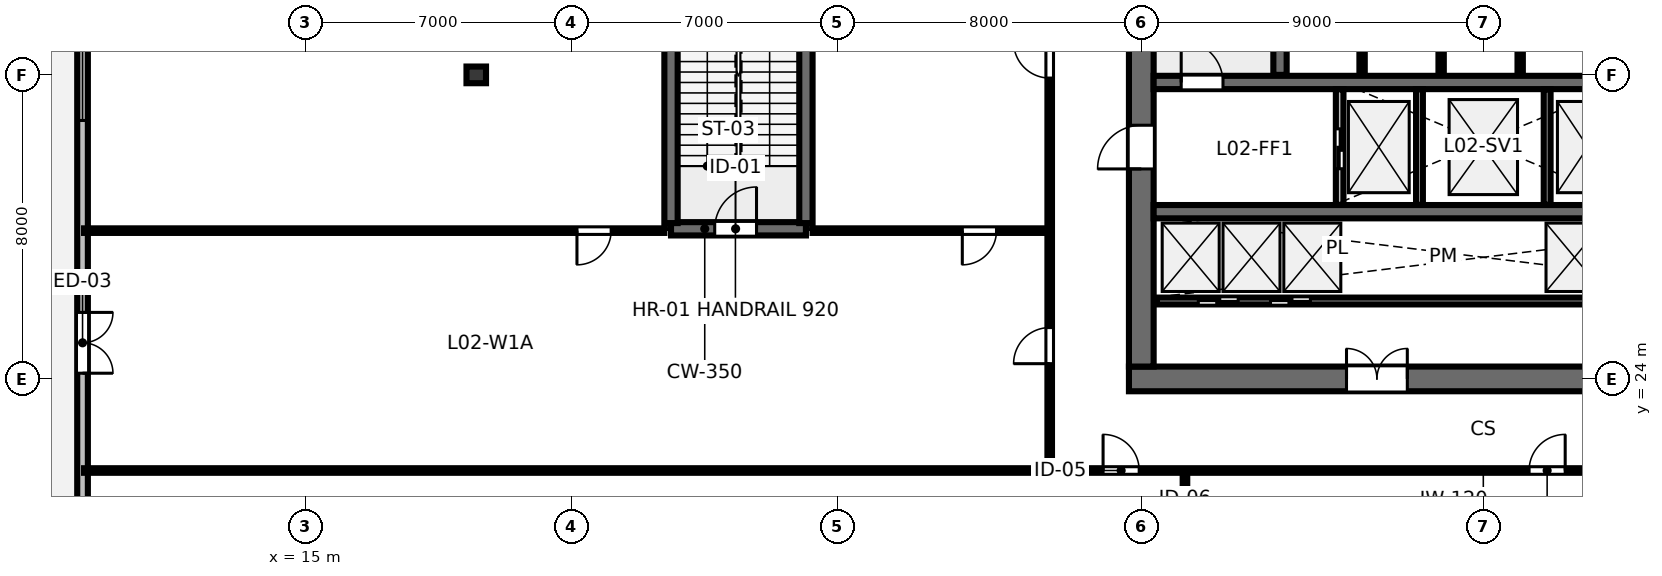
"""IFC4 building model, lengths in metres.
Left out: names, types, materials, properties, quantities, classifications, styles, units other than length and angle.
Written with IfcOpenShell. Run it as: python <this file> out.ifc"""

import sys

from ifc_helpers import new_model, si_unit, direction, frame, frame_2d, origin, origin_2d, place, context, subcontext, project, spatial, rectangle, i_section, extrude, element, fill, save


model = new_model("IFC4")
c1 = context("Model", 3, precision=1e-05, world=origin(), true_north=direction((0.0, 1.0)))
c2 = subcontext(c1, "Body", "Model", "MODEL_VIEW")
j1 = project(units=[si_unit("LENGTHUNIT", "METRE"), si_unit("PLANEANGLEUNIT", "RADIAN")], contexts=[c1])
p1 = place(None, origin())
s1 = spatial("IfcSite", under=j1, at=p1, CompositionType="ELEMENT")
p2 = place(p1, origin())
s2 = spatial("IfcBuilding", under=s1, at=p2, CompositionType="ELEMENT")
p3 = place(p2, frame((0.0, 0.0, 9.5)))
s3 = spatial("IfcBuildingStorey", under=s2, at=p3, CompositionType="ELEMENT", Elevation=9.5)
p4 = place(p3, frame((36.675, 24.0, 0.0), z_axis=(0.0, 0.0, 1.0), x_axis=(1.0, 0.0, 0.0)))
e1 = element("IfcWall", 1, at=p4, inside=s3, PredefinedType="SHEAR", context=c2, shape_type="SweptSolid", body=[
    extrude(rectangle(XDim=18.65, YDim=0.65, at=frame_2d((9.325, 0.0))), origin(), (0.0, 0.0, 1.0), 4.22),
])
p5 = place(p4, frame((5.725, 0.0, 0.0)))
e2 = element("IfcOpeningElement", 2, at=p5, cuts=e1, PredefinedType="OPENING", context=c2, shape_type="SweptSolid", body=[
    extrude(rectangle(XDim=1.6, YDim=2.15, at=frame_2d((0.8, 1.075))), frame((0.0, 0.335, 0.0), z_axis=(0.0, -1.0, 0.0), x_axis=(1.0, 0.0, 0.0)), (0.0, 0.0, 1.0), 0.67),
])
p6 = place(p4, frame((12.125, 0.0, 0.0)))
e3 = element("IfcOpeningElement", 3, at=p6, cuts=e1, PredefinedType="OPENING", context=c2, shape_type="SweptSolid", body=[
    extrude(rectangle(XDim=1.6, YDim=2.15, at=frame_2d((0.8, 1.075))), frame((0.0, 0.335, 0.0), z_axis=(0.0, -1.0, 0.0), x_axis=(1.0, 0.0, 0.0)), (0.0, 0.0, 1.0), 0.67),
])
p7 = place(p3, frame((37.0, 24.325, 0.0), z_axis=(0.0, 0.0, 1.0), x_axis=(0.0, 1.0, 0.0)))
e4 = element("IfcWall", 4, at=p7, inside=s3, PredefinedType="SHEAR", context=c2, shape_type="SweptSolid", body=[
    extrude(rectangle(XDim=15.35, YDim=0.65, at=frame_2d((7.675, 0.0))), origin(), (0.0, 0.0, 1.0), 4.22),
])
p8 = place(p7, frame((5.2, 0.0, 0.0)))
e5 = element("IfcOpeningElement", 5, at=p8, cuts=e4, PredefinedType="OPENING", context=c2, shape_type="SweptSolid", body=[
    extrude(rectangle(XDim=1.15, YDim=2.15, at=frame_2d((0.575, 1.075))), frame((0.0, 0.335, 0.0), z_axis=(0.0, -1.0, 0.0), x_axis=(1.0, 0.0, 0.0)), (0.0, 0.0, 1.0), 0.67),
])
p9 = place(p3, frame((37.325, 31.8, 0.0), z_axis=(0.0, 0.0, 1.0), x_axis=(1.0, 0.0, 0.0)))
e6 = element("IfcWall", 6, at=p9, inside=s3, PredefinedType="SHEAR", context=c2, shape_type="SweptSolid", body=[
    extrude(rectangle(XDim=17.35, YDim=0.35, at=frame_2d((8.675, 0.0))), origin(), (0.0, 0.0, 1.0), 4.22),
])
p10 = place(p9, frame((0.725, 0.0, 0.0)))
e7 = element("IfcOpeningElement", 7, at=p10, cuts=e6, PredefinedType="OPENING", context=c2, shape_type="SweptSolid", body=[
    extrude(rectangle(XDim=1.1, YDim=2.15, at=frame_2d((0.55, 1.075))), frame((0.0, 0.185, 0.0), z_axis=(0.0, -1.0, 0.0), x_axis=(1.0, 0.0, 0.0)), (0.0, 0.0, 1.0), 0.37),
])
p11 = place(p9, frame((14.625, 0.0, 0.0)))
e8 = element("IfcOpeningElement", 8, at=p11, cuts=e6, PredefinedType="OPENING", context=c2, shape_type="SweptSolid", body=[
    extrude(rectangle(XDim=1.1, YDim=2.15, at=frame_2d((0.55, 1.075))), frame((0.0, 0.185, 0.0), z_axis=(0.0, -1.0, 0.0), x_axis=(1.0, 0.0, 0.0)), (0.0, 0.0, 1.0), 0.37),
])
p12 = place(p3, frame((37.325, 28.4, 0.0), z_axis=(0.0, 0.0, 1.0), x_axis=(1.0, 0.0, 0.0)))
e9 = element("IfcWall", 9, at=p12, inside=s3, PredefinedType="SHEAR", context=c2, shape_type="SweptSolid", body=[
    extrude(rectangle(XDim=17.35, YDim=0.35, at=frame_2d((8.675, 0.0))), origin(), (0.0, 0.0, 1.0), 4.22),
])
p13 = place(p3, frame((19.5, 32.0, 0.0), z_axis=(0.0, 0.0, 1.0), x_axis=(0.0, 1.0, 0.0)))
e10 = element("IfcColumn", 10, at=p13, inside=s3, PredefinedType="COLUMN", context=c2, shape_type="SweptSolid", body=[
    extrude(i_section(OverallWidth=0.439, OverallDepth=0.514, WebThickness=0.06, FlangeThickness=0.097, FilletRadius=0.025, at=origin_2d()), origin(), (0.0, 0.0, 1.0), 4.208),
])
p14 = place(p3, frame((9.14, 53.24, 0.0), z_axis=(0.0, 0.0, 1.0), x_axis=(0.0, -1.0, 0.0)))
e11 = element("IfcWall", 11, at=p14, inside=s3, PredefinedType="STANDARD", context=c2, shape_type="SweptSolid", body=[
    extrude(rectangle(XDim=42.48, YDim=0.28, at=frame_2d((21.24, 0.0))), origin(), (0.0, 0.0, 1.0), 4.21),
])
p15 = place(p14, frame((27.49, 0.0, 0.0)))
e12 = element("IfcOpeningElement", 12, at=p15, cuts=e11, PredefinedType="OPENING", context=c2, shape_type="SweptSolid", body=[
    extrude(rectangle(XDim=1.6, YDim=2.15, at=frame_2d((0.8, 1.075))), frame((0.0, 0.15, 0.0), z_axis=(0.0, -1.0, 0.0), x_axis=(1.0, 0.0, 0.0)), (0.0, 0.0, 1.0), 0.3),
])
p16 = place(p14, frame((1.731, 0.0, 0.85)))
e13 = element("IfcOpeningElement", 13, at=p16, cuts=e11, PredefinedType="OPENING", context=c2, shape_type="SweptSolid", body=[
    extrude(rectangle(XDim=2.4, YDim=2.4, at=frame_2d((1.2, 1.2))), frame((0.0, 0.15, 0.0), z_axis=(0.0, -1.0, 0.0), x_axis=(1.0, 0.0, 0.0)), (0.0, 0.0, 1.0), 0.3),
])
p17 = place(p14, frame((5.393, 0.0, 0.85)))
e14 = element("IfcOpeningElement", 14, at=p17, cuts=e11, PredefinedType="OPENING", context=c2, shape_type="SweptSolid", body=[
    extrude(rectangle(XDim=2.4, YDim=2.4, at=frame_2d((1.2, 1.2))), frame((0.0, 0.15, 0.0), z_axis=(0.0, -1.0, 0.0), x_axis=(1.0, 0.0, 0.0)), (0.0, 0.0, 1.0), 0.3),
])
p18 = place(p14, frame((12.716, 0.0, 0.85)))
e15 = element("IfcOpeningElement", 15, at=p18, cuts=e11, PredefinedType="OPENING", context=c2, shape_type="SweptSolid", body=[
    extrude(rectangle(XDim=2.4, YDim=2.4, at=frame_2d((1.2, 1.2))), frame((0.0, 0.15, 0.0), z_axis=(0.0, -1.0, 0.0), x_axis=(1.0, 0.0, 0.0)), (0.0, 0.0, 1.0), 0.3),
])
p19 = place(p14, frame((20.04, 0.0, 0.85)))
e16 = element("IfcOpeningElement", 16, at=p19, cuts=e11, PredefinedType="OPENING", context=c2, shape_type="SweptSolid", body=[
    extrude(rectangle(XDim=2.4, YDim=2.4, at=frame_2d((1.2, 1.2))), frame((0.0, 0.15, 0.0), z_axis=(0.0, -1.0, 0.0), x_axis=(1.0, 0.0, 0.0)), (0.0, 0.0, 1.0), 0.3),
])
p20 = place(p14, frame((34.687, 0.0, 0.85)))
e17 = element("IfcOpeningElement", 17, at=p20, cuts=e11, PredefinedType="OPENING", context=c2, shape_type="SweptSolid", body=[
    extrude(rectangle(XDim=2.4, YDim=2.4, at=frame_2d((1.2, 1.2))), frame((0.0, 0.15, 0.0), z_axis=(0.0, -1.0, 0.0), x_axis=(1.0, 0.0, 0.0)), (0.0, 0.0, 1.0), 0.3),
])
p21 = place(p14, frame((38.349, 0.0, 0.85)))
e18 = element("IfcOpeningElement", 18, at=p21, cuts=e11, PredefinedType="OPENING", context=c2, shape_type="SweptSolid", body=[
    extrude(rectangle(XDim=2.4, YDim=2.4, at=frame_2d((1.2, 1.2))), frame((0.0, 0.15, 0.0), z_axis=(0.0, -1.0, 0.0), x_axis=(1.0, 0.0, 0.0)), (0.0, 0.0, 1.0), 0.3),
])
p22 = place(p3, frame((40.65, 32.0, 0.0), z_axis=(0.0, 0.0, 1.0), x_axis=(0.0, 1.0, 0.0)))
e19 = element("IfcWall", 19, at=p22, inside=s3, PredefinedType="SHEAR", context=c2, shape_type="SweptSolid", body=[
    extrude(rectangle(XDim=7.7, YDim=0.35, at=frame_2d((3.85, 0.0))), origin(), (0.0, 0.0, 1.0), 4.5),
])
for number, where, z_axis, x_axis in (
    (20, (42.81, 32.05, 0.0), (0.0, 0.0, 1.0), (0.0, 1.0, 0.0)),
    (21, (44.89, 32.05, 0.0), (0.0, 0.0, 1.0), (0.0, 1.0, 0.0)),
    (22, (46.97, 32.05, 0.0), (0.0, 0.0, 1.0), (0.0, 1.0, 0.0)),
):
    element("IfcWall", number, at=place(p3, frame(where, z_axis=z_axis, x_axis=x_axis)), inside=s3, PredefinedType="PARTITIONING", context=c2, shape_type="SweptSolid", body=[
        extrude(rectangle(XDim=5.5, YDim=0.14, at=frame_2d((2.75, 0.0))), origin(), (0.0, 0.0, 1.0), 4.21),
    ])
p23 = place(p3, frame((42.22, 28.58, 0.0), z_axis=(0.0, 0.0, 1.0), x_axis=(0.0, 1.0, 0.0)))
e23 = element("IfcWall", 23, at=p23, inside=s3, PredefinedType="PARTITIONING", context=c2, shape_type="SweptSolid", body=[
    extrude(rectangle(XDim=3.04, YDim=0.2, at=frame_2d((1.52, 0.0))), origin(), (0.0, 0.0, 1.0), 4.21),
])
p24 = place(p23, frame((0.95, 0.0, 0.0)))
e24 = element("IfcOpeningElement", 24, at=p24, cuts=e23, PredefinedType="OPENING", context=c2, shape_type="SweptSolid", body=[
    extrude(rectangle(XDim=1.05, YDim=2.15, at=frame_2d((0.525, 1.075))), frame((0.0, 0.11, 0.0), z_axis=(0.0, -1.0, 0.0), x_axis=(1.0, 0.0, 0.0)), (0.0, 0.0, 1.0), 0.22),
])
for number, where, z_axis, x_axis in (
    (25, (44.32, 28.58, 0.0), (0.0, 0.0, 1.0), (0.0, 1.0, 0.0)),
    (26, (47.68, 28.58, 0.0), (0.0, 0.0, 1.0), (0.0, 1.0, 0.0)),
):
    element("IfcWall", number, at=place(p3, frame(where, z_axis=z_axis, x_axis=x_axis)), inside=s3, PredefinedType="PARTITIONING", context=c2, shape_type="SweptSolid", body=[
        extrude(rectangle(XDim=3.04, YDim=0.18, at=frame_2d((1.52, 0.0))), origin(), (0.0, 0.0, 1.0), 4.21),
    ])
p25 = place(p3, frame((37.4, 26.05, 0.0), z_axis=(0.0, 0.0, 1.0), x_axis=(1.0, 0.0, 0.0)))
e27 = element("IfcWall", 27, at=p25, inside=s3, PredefinedType="PARTITIONING", context=c2, shape_type="SweptSolid", body=[
    extrude(rectangle(XDim=17.2, YDim=0.18, at=frame_2d((8.6, 0.0))), origin(), (0.0, 0.0, 1.0), 4.21),
])
p26 = place(p25, frame((1.1, 0.0, 0.0)))
e28 = element("IfcOpeningElement", 28, at=p26, cuts=e27, PredefinedType="OPENING", context=c2, shape_type="SweptSolid", body=[
    extrude(rectangle(XDim=1.05, YDim=2.15, at=frame_2d((0.525, 1.075))), frame((0.0, 0.1, 0.0), z_axis=(0.0, -1.0, 0.0), x_axis=(1.0, 0.0, 0.0)), (0.0, 0.0, 1.0), 0.2),
])
p27 = place(p25, frame((3.0, 0.0, 0.0)))
e29 = element("IfcOpeningElement", 29, at=p27, cuts=e27, PredefinedType="OPENING", context=c2, shape_type="SweptSolid", body=[
    extrude(rectangle(XDim=1.05, YDim=2.15, at=frame_2d((0.525, 1.075))), frame((0.0, 0.1, 0.0), z_axis=(0.0, -1.0, 0.0), x_axis=(1.0, 0.0, 0.0)), (0.0, 0.0, 1.0), 0.2),
])
p28 = place(p3, frame((38.149, 21.59, 0.0), z_axis=(0.0, 0.0, 1.0), x_axis=(0.0, -1.0, 0.0)))
e30 = element("IfcWall", 30, at=p28, inside=s3, PredefinedType="MOVABLE", context=c2, shape_type="SweptSolid", body=[
    extrude(rectangle(XDim=15.21, YDim=0.12, at=frame_2d((7.605, 0.0))), origin(), (0.0, 0.0, 1.0), 3.31),
])
p29 = place(p28, frame((1.4, 0.0, 0.0)))
e31 = element("IfcOpeningElement", 31, at=p29, cuts=e30, PredefinedType="OPENING", context=c2, shape_type="SweptSolid", body=[
    extrude(rectangle(XDim=0.9, YDim=2.15, at=frame_2d((0.45, 1.075))), frame((0.0, 0.07, 0.0), z_axis=(0.0, -1.0, 0.0), x_axis=(1.0, 0.0, 0.0)), (0.0, 0.0, 1.0), 0.14),
])
p30 = place(p3, frame((34.65, 21.59, 0.0), z_axis=(0.0, 0.0, 1.0), x_axis=(1.0, 0.0, 0.0)))
e32 = element("IfcWall", 32, at=p30, inside=s3, PredefinedType="PARTITIONING", context=c2, shape_type="SweptSolid", body=[
    extrude(rectangle(XDim=22.7, YDim=0.12, at=frame_2d((11.35, 0.0))), origin(), (0.0, 0.0, 1.0), 3.31),
])
p31 = place(p30, frame((1.344, 0.0, 0.0)))
e33 = element("IfcOpeningElement", 33, at=p31, cuts=e32, PredefinedType="OPENING", context=c2, shape_type="SweptSolid", body=[
    extrude(rectangle(XDim=0.95, YDim=2.15, at=frame_2d((0.475, 1.075))), frame((0.0, 0.07, 0.0), z_axis=(0.0, -1.0, 0.0), x_axis=(1.0, 0.0, 0.0)), (0.0, 0.0, 1.0), 0.14),
])
p32 = place(p30, frame((12.554, 0.0, 0.0)))
e34 = element("IfcOpeningElement", 34, at=p32, cuts=e32, PredefinedType="OPENING", context=c2, shape_type="SweptSolid", body=[
    extrude(rectangle(XDim=0.95, YDim=2.15, at=frame_2d((0.475, 1.075))), frame((0.0, 0.07, 0.0), z_axis=(0.0, -1.0, 0.0), x_axis=(1.0, 0.0, 0.0)), (0.0, 0.0, 1.0), 0.14),
])
p33 = place(p3, frame((34.59, 27.902, 0.0), z_axis=(0.0, 0.0, 1.0), x_axis=(-1.0, 0.0, 0.0)))
e35 = element("IfcWall", 35, at=p33, inside=s3, PredefinedType="PARTITIONING", context=c2, shape_type="SweptSolid", body=[
    extrude(rectangle(XDim=6.24, YDim=0.12, at=frame_2d((3.12, 0.0))), origin(), (0.0, 0.0, 1.0), 3.31),
])
p34 = place(p33, frame((1.4, 0.0, 0.0)))
e36 = element("IfcOpeningElement", 36, at=p34, cuts=e35, PredefinedType="OPENING", context=c2, shape_type="SweptSolid", body=[
    extrude(rectangle(XDim=0.9, YDim=2.15, at=frame_2d((0.45, 1.075))), frame((0.0, 0.07, 0.0), z_axis=(0.0, -1.0, 0.0), x_axis=(1.0, 0.0, 0.0)), (0.0, 0.0, 1.0), 0.14),
])
p35 = place(p3, frame((24.45, 27.902, 0.0), z_axis=(0.0, 0.0, 1.0), x_axis=(-1.0, 0.0, 0.0)))
e37 = element("IfcWall", 37, at=p35, inside=s3, PredefinedType="PARTITIONING", context=c2, shape_type="SweptSolid", body=[
    extrude(rectangle(XDim=15.27, YDim=0.12, at=frame_2d((7.635, 0.0))), origin(), (0.0, 0.0, 1.0), 3.31),
])
p36 = place(p35, frame((1.4, 0.0, 0.0)))
e38 = element("IfcOpeningElement", 38, at=p36, cuts=e37, PredefinedType="OPENING", context=c2, shape_type="SweptSolid", body=[
    extrude(rectangle(XDim=0.9, YDim=2.15, at=frame_2d((0.45, 1.075))), frame((0.0, 0.07, 0.0), z_axis=(0.0, -1.0, 0.0), x_axis=(1.0, 0.0, 0.0)), (0.0, 0.0, 1.0), 0.14),
])
p37 = place(p3, frame((34.59, 21.65, 0.0), z_axis=(0.0, 0.0, 1.0), x_axis=(0.0, 1.0, 0.0)))
e39 = element("IfcWall", 39, at=p37, inside=s3, PredefinedType="PARTITIONING", context=c2, shape_type="SweptSolid", body=[
    extrude(rectangle(XDim=20.7, YDim=0.12, at=frame_2d((10.35, 0.0))), origin(), (0.0, 0.0, 1.0), 3.31),
])
p38 = place(p37, frame((2.751, 0.0, 0.0)))
e40 = element("IfcOpeningElement", 40, at=p38, cuts=e39, PredefinedType="OPENING", context=c2, shape_type="SweptSolid", body=[
    extrude(rectangle(XDim=0.95, YDim=2.15, at=frame_2d((0.475, 1.075))), frame((0.0, 0.07, 0.0), z_axis=(0.0, -1.0, 0.0), x_axis=(1.0, 0.0, 0.0)), (0.0, 0.0, 1.0), 0.14),
])
p39 = place(p37, frame((10.266, 0.0, 0.0)))
e41 = element("IfcOpeningElement", 41, at=p39, cuts=e39, PredefinedType="OPENING", context=c2, shape_type="SweptSolid", body=[
    extrude(rectangle(XDim=0.95, YDim=2.15, at=frame_2d((0.475, 1.075))), frame((0.0, 0.07, 0.0), z_axis=(0.0, -1.0, 0.0), x_axis=(1.0, 0.0, 0.0)), (0.0, 0.0, 1.0), 0.14),
])
p40 = place(p37, frame((17.39, 0.0, 0.0)))
e42 = element("IfcOpeningElement", 42, at=p40, cuts=e39, PredefinedType="OPENING", context=c2, shape_type="SweptSolid", body=[
    extrude(rectangle(XDim=0.95, YDim=2.15, at=frame_2d((0.475, 1.075))), frame((0.0, 0.07, 0.0), z_axis=(0.0, -1.0, 0.0), x_axis=(1.0, 0.0, 0.0)), (0.0, 0.0, 1.0), 0.14),
])
p41 = place(p3, frame((34.65, 21.59, 0.0), z_axis=(0.0, 0.0, 1.0), x_axis=(-1.0, 0.0, 0.0)))
e43 = element("IfcWall", 43, at=p41, inside=s3, PredefinedType="PARTITIONING", context=c2, shape_type="SweptSolid", body=[
    extrude(rectangle(XDim=25.47, YDim=0.12, at=frame_2d((12.735, 0.0))), origin(), (0.0, 0.0, 1.0), 3.31),
])
p42 = place(p3, frame((24.625, 27.95, 0.0), z_axis=(0.0, 0.0, 1.0), x_axis=(1.0, 0.0, 0.0)))
e44 = element("IfcWall", 44, at=p42, inside=s3, PredefinedType="SHEAR", context=c2, shape_type="SweptSolid", body=[
    extrude(rectangle(XDim=3.55, YDim=0.35, at=frame_2d((1.775, 0.0))), origin(), (0.0, 0.0, 1.0), 4.5),
])
p43 = place(p42, frame((1.15, 0.0, 0.0)))
e45 = element("IfcOpeningElement", 45, at=p43, cuts=e44, PredefinedType="OPENING", context=c2, shape_type="SweptSolid", body=[
    extrude(rectangle(XDim=1.1, YDim=2.15, at=frame_2d((0.55, 1.075))), frame((0.0, 0.185, 0.0), z_axis=(0.0, -1.0, 0.0), x_axis=(1.0, 0.0, 0.0)), (0.0, 0.0, 1.0), 0.37),
])
for number, where, z_axis, x_axis in (
    (46, (24.625, 28.1, 0.0), (0.0, 0.0, 1.0), (0.0, 1.0, 0.0)),
    (47, (28.175, 28.1, 0.0), (0.0, 0.0, 1.0), (0.0, 1.0, 0.0)),
):
    element("IfcWall", number, at=place(p3, frame(where, z_axis=z_axis, x_axis=x_axis)), inside=s3, PredefinedType="SHEAR", context=c2, shape_type="SweptSolid", body=[
        extrude(rectangle(XDim=7.7, YDim=0.35, at=frame_2d((3.85, 0.0))), origin(), (0.0, 0.0, 1.0), 4.5),
    ])
p44 = place(p15, origin())
e48 = element("IfcDoor", 48, at=p44, inside=s3, OperationType="DOUBLE_DOOR_SINGLE_SWING", PredefinedType="DOOR", context=c2, shape_type="SweptSolid", body=[
    extrude(rectangle(XDim=1.6, YDim=2.15, at=frame_2d((0.8, 1.075))), frame((0.0, 0.025, 0.0), z_axis=(0.0, -1.0, 0.0), x_axis=(1.0, 0.0, 0.0)), (0.0, 0.0, 1.0), 0.05),
])
fill(e12, e48)
p45 = place(p19, origin())
e49 = element("IfcWindow", 49, at=p45, inside=s3, PartitioningType="SINGLE_PANEL", PredefinedType="WINDOW", context=c2, shape_type="SweptSolid", body=[
    extrude(rectangle(XDim=2.4, YDim=2.4, at=frame_2d((1.2, 1.2))), frame((0.0, 0.03, 0.0), z_axis=(0.0, -1.0, 0.0), x_axis=(1.0, 0.0, 0.0)), (0.0, 0.0, 1.0), 0.06),
])
fill(e16, e49)
p46 = place(p10, origin())
e50 = element("IfcDoor", 50, at=p46, inside=s3, OperationType="SINGLE_SWING_LEFT", PredefinedType="DOOR", context=c2, shape_type="SweptSolid", body=[
    extrude(rectangle(XDim=1.1, YDim=2.15, at=frame_2d((0.55, 1.075))), frame((0.0, 0.025, 0.0), z_axis=(0.0, -1.0, 0.0), x_axis=(1.0, 0.0, 0.0)), (0.0, 0.0, 1.0), 0.05),
])
fill(e7, e50)
p47 = place(p8, origin())
e51 = element("IfcDoor", 51, at=p47, inside=s3, OperationType="SINGLE_SWING_LEFT", PredefinedType="DOOR", context=c2, shape_type="SweptSolid", body=[
    extrude(rectangle(XDim=1.15, YDim=2.15, at=frame_2d((0.575, 1.075))), frame((0.0, 0.025, 0.0), z_axis=(0.0, -1.0, 0.0), x_axis=(1.0, 0.0, 0.0)), (0.0, 0.0, 1.0), 0.05),
])
fill(e5, e51)
p48 = place(p5, origin())
e52 = element("IfcDoor", 52, at=p48, inside=s3, OperationType="DOUBLE_DOOR_SINGLE_SWING", PredefinedType="DOOR", context=c2, shape_type="SweptSolid", body=[
    extrude(rectangle(XDim=1.6, YDim=2.15, at=frame_2d((0.8, 1.075))), frame((0.0, 0.025, 0.0), z_axis=(0.0, -1.0, 0.0), x_axis=(1.0, 0.0, 0.0)), (0.0, 0.0, 1.0), 0.05),
])
fill(e2, e52)
p49 = place(p24, origin())
e53 = element("IfcDoor", 53, at=p49, inside=s3, OperationType="SLIDING_TO_LEFT", PredefinedType="DOOR", context=c2, shape_type="SweptSolid", body=[
    extrude(rectangle(XDim=1.05, YDim=2.15, at=frame_2d((0.525, 1.075))), frame((0.0, 0.025, 0.0), z_axis=(0.0, -1.0, 0.0), x_axis=(1.0, 0.0, 0.0)), (0.0, 0.0, 1.0), 0.05),
])
fill(e24, e53)
p50 = place(p26, origin())
e54 = element("IfcDoor", 54, at=p50, inside=s3, OperationType="SLIDING_TO_LEFT", PredefinedType="DOOR", context=c2, shape_type="SweptSolid", body=[
    extrude(rectangle(XDim=1.05, YDim=2.15, at=frame_2d((0.525, 1.075))), frame((0.0, 0.025, 0.0), z_axis=(0.0, -1.0, 0.0), x_axis=(1.0, 0.0, 0.0)), (0.0, 0.0, 1.0), 0.05),
])
fill(e28, e54)
p51 = place(p27, origin())
e55 = element("IfcDoor", 55, at=p51, inside=s3, OperationType="SLIDING_TO_RIGHT", PredefinedType="DOOR", context=c2, shape_type="SweptSolid", body=[
    extrude(rectangle(XDim=1.05, YDim=2.15, at=frame_2d((0.525, 1.075))), frame((0.0, 0.025, 0.0), z_axis=(0.0, -1.0, 0.0), x_axis=(1.0, 0.0, 0.0)), (0.0, 0.0, 1.0), 0.05),
])
fill(e29, e55)
p52 = place(p31, origin())
e56 = element("IfcDoor", 56, at=p52, inside=s3, OperationType="SINGLE_SWING_LEFT", PredefinedType="DOOR", context=c2, shape_type="SweptSolid", body=[
    extrude(rectangle(XDim=0.95, YDim=2.15, at=frame_2d((0.475, 1.075))), frame((0.0, 0.025, 0.0), z_axis=(0.0, -1.0, 0.0), x_axis=(1.0, 0.0, 0.0)), (0.0, 0.0, 1.0), 0.05),
])
fill(e33, e56)
p53 = place(p32, origin())
e57 = element("IfcDoor", 57, at=p53, inside=s3, OperationType="SINGLE_SWING_RIGHT", PredefinedType="DOOR", context=c2, shape_type="SweptSolid", body=[
    extrude(rectangle(XDim=0.95, YDim=2.15, at=frame_2d((0.475, 1.075))), frame((0.0, 0.025, 0.0), z_axis=(0.0, -1.0, 0.0), x_axis=(1.0, 0.0, 0.0)), (0.0, 0.0, 1.0), 0.05),
])
fill(e34, e57)
p54 = place(p34, origin())
e58 = element("IfcDoor", 58, at=p54, inside=s3, OperationType="SINGLE_SWING_RIGHT", PredefinedType="DOOR", context=c2, shape_type="SweptSolid", body=[
    extrude(rectangle(XDim=0.9, YDim=2.15, at=frame_2d((0.45, 1.075))), frame((0.0, 0.025, 0.0), z_axis=(0.0, -1.0, 0.0), x_axis=(1.0, 0.0, 0.0)), (0.0, 0.0, 1.0), 0.05),
])
fill(e36, e58)
p55 = place(p36, origin())
e59 = element("IfcDoor", 59, at=p55, inside=s3, OperationType="SINGLE_SWING_RIGHT", PredefinedType="DOOR", context=c2, shape_type="SweptSolid", body=[
    extrude(rectangle(XDim=0.9, YDim=2.15, at=frame_2d((0.45, 1.075))), frame((0.0, 0.025, 0.0), z_axis=(0.0, -1.0, 0.0), x_axis=(1.0, 0.0, 0.0)), (0.0, 0.0, 1.0), 0.05),
])
fill(e38, e59)
p56 = place(p38, origin())
e60 = element("IfcDoor", 60, at=p56, inside=s3, OperationType="SINGLE_SWING_LEFT", PredefinedType="DOOR", context=c2, shape_type="SweptSolid", body=[
    extrude(rectangle(XDim=0.95, YDim=2.15, at=frame_2d((0.475, 1.075))), frame((0.0, 0.025, 0.0), z_axis=(0.0, -1.0, 0.0), x_axis=(1.0, 0.0, 0.0)), (0.0, 0.0, 1.0), 0.05),
])
fill(e40, e60)
p57 = place(p39, origin())
e61 = element("IfcDoor", 61, at=p57, inside=s3, OperationType="SINGLE_SWING_RIGHT", PredefinedType="DOOR", context=c2, shape_type="SweptSolid", body=[
    extrude(rectangle(XDim=0.95, YDim=2.15, at=frame_2d((0.475, 1.075))), frame((0.0, 0.025, 0.0), z_axis=(0.0, -1.0, 0.0), x_axis=(1.0, 0.0, 0.0)), (0.0, 0.0, 1.0), 0.05),
])
fill(e41, e61)
p58 = place(p43, origin())
e62 = element("IfcDoor", 62, at=p58, inside=s3, OperationType="SINGLE_SWING_RIGHT", PredefinedType="DOOR", context=c2, shape_type="SweptSolid", body=[
    extrude(rectangle(XDim=1.1, YDim=2.15, at=frame_2d((0.55, 1.075))), frame((0.0, 0.025, 0.0), z_axis=(0.0, -1.0, 0.0), x_axis=(1.0, 0.0, 0.0)), (0.0, 0.0, 1.0), 0.05),
])
fill(e45, e62)
save(model, sys.argv[1])
